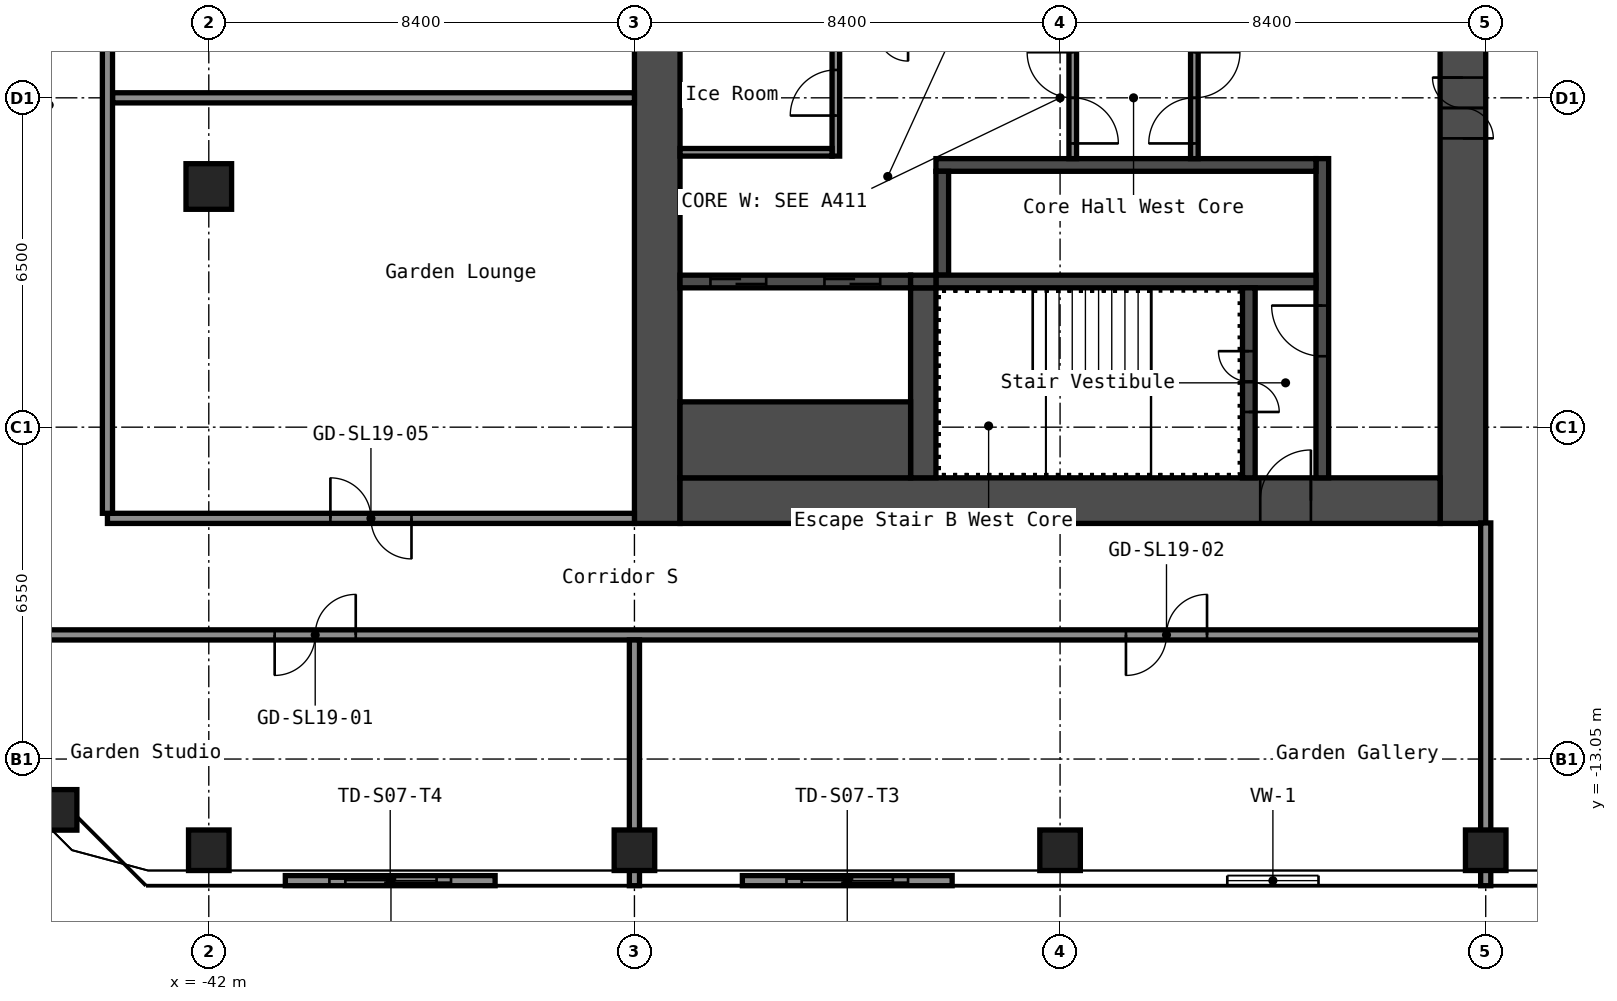
"""IFC4 building model, lengths in metres.
Left out: names, types, materials, properties, quantities, classifications, styles, units other than length and angle.
Written with IfcOpenShell. Run it as: python <this file> out.ifc"""

import sys

from ifc_helpers import new_model, si_unit, direction, frame, frame_2d, origin, origin_2d, place, context, subcontext, project, spatial, rectangle, hollow_rectangle, extrude, element, fill, save


model = new_model("IFC4")
c1 = context("Model", 3, precision=1e-05, world=origin(), true_north=direction((0.0, 1.0)))
c2 = subcontext(c1, "Body", "Model", "MODEL_VIEW")
j1 = project(units=[si_unit("LENGTHUNIT", "METRE"), si_unit("PLANEANGLEUNIT", "RADIAN")], contexts=[c1])
p1 = place(None, origin())
s1 = spatial("IfcSite", under=j1, at=p1, CompositionType="ELEMENT")
p2 = place(p1, origin())
s2 = spatial("IfcBuilding", under=s1, at=p2, CompositionType="ELEMENT")
p3 = place(p2, frame((0.0, 0.0, 69.0)))
s3 = spatial("IfcBuildingStorey", under=s2, at=p3, CompositionType="ELEMENT", Elevation=69.0)
for number, where, z_axis, x_axis in (
    (1, (-45.003, -14.053, 0.0), (0.0, 0.0, 1.0), (1.0, 0.0, 0.0)),
    (2, (-42.0, -14.85, 0.0), (0.0, 0.0, 1.0), (1.0, 0.0, 0.0)),
):
    element("IfcColumn", number, at=place(p3, frame(where, z_axis=z_axis, x_axis=x_axis)), inside=s3, PredefinedType="COLUMN", context=c2, shape_type="SweptSolid", body=[
        extrude(hollow_rectangle(XDim=0.8, YDim=0.8, WallThickness=0.032, at=origin_2d()), origin(), (0.0, 0.0, 1.0), 6.0),
    ])
p4 = place(p3, frame((-42.0, -1.75, 0.0), z_axis=(0.0, 0.0, 1.0), x_axis=(1.0, 0.0, 0.0)))
e3 = element("IfcColumn", 3, at=p4, inside=s3, PredefinedType="COLUMN", context=c2, shape_type="SweptSolid", body=[
    extrude(hollow_rectangle(XDim=0.9, YDim=0.9, WallThickness=0.036, at=origin_2d()), origin(), (0.0, 0.0, 1.0), 6.0),
])
for number, where, z_axis, x_axis in (
    (4, (-33.6, -14.85, 0.0), (0.0, 0.0, 1.0), (1.0, 0.0, 0.0)),
    (5, (-25.2, -14.85, 0.0), (0.0, 0.0, 1.0), (1.0, 0.0, 0.0)),
    (6, (-16.8, -14.85, 0.0), (0.0, 0.0, 1.0), (1.0, 0.0, 0.0)),
):
    element("IfcColumn", number, at=place(p3, frame(where, z_axis=z_axis, x_axis=x_axis)), inside=s3, PredefinedType="COLUMN", context=c2, shape_type="SweptSolid", body=[
        extrude(hollow_rectangle(XDim=0.8, YDim=0.8, WallThickness=0.032, at=origin_2d()), origin(), (0.0, 0.0, 1.0), 6.0),
    ])
p5 = place(p3, frame((-17.25, -8.4, 0.0), z_axis=(0.0, 0.0, 1.0), x_axis=(0.0, 1.0, 0.0)))
e7 = element("IfcWall", 7, at=p5, inside=s3, PredefinedType="SHEAR", context=c2, shape_type="SweptSolid", body=[
    extrude(rectangle(XDim=16.8, YDim=0.9, at=frame_2d((8.4, 0.0))), origin(), (0.0, 0.0, 1.0), 6.0),
])
p6 = place(p5, frame((7.6, 0.0, 0.0)))
e8 = element("IfcOpeningElement", 8, at=p6, cuts=e7, PredefinedType="OPENING", context=c2, shape_type="SweptSolid", body=[
    extrude(rectangle(XDim=1.2, YDim=2.1, at=frame_2d((0.6, 1.05))), frame((0.0, 0.46, 0.0), z_axis=(0.0, -1.0, 0.0), x_axis=(1.0, 0.0, 0.0)), (0.0, 0.0, 1.0), 0.92),
])
p7 = place(p3, frame((-33.15, -8.4, 0.0), z_axis=(0.0, 0.0, 1.0), x_axis=(0.0, 1.0, 0.0)))
e9 = element("IfcWall", 9, at=p7, inside=s3, PredefinedType="SHEAR", context=c2, shape_type="SweptSolid", body=[
    extrude(rectangle(XDim=16.8, YDim=0.9, at=frame_2d((8.4, 0.0))), origin(), (0.0, 0.0, 1.0), 6.0),
])
p8 = place(p3, frame((-32.7, -7.95, 0.0), z_axis=(0.0, 0.0, 1.0), x_axis=(1.0, 0.0, 0.0)))
e10 = element("IfcWall", 10, at=p8, inside=s3, PredefinedType="SHEAR", context=c2, shape_type="SweptSolid", body=[
    extrude(rectangle(XDim=15.0, YDim=0.9, at=frame_2d((7.5, 0.0))), origin(), (0.0, 0.0, 1.0), 6.0),
])
p9 = place(p8, frame((11.45, 0.0, 0.0)))
e11 = element("IfcOpeningElement", 11, at=p9, cuts=e10, PredefinedType="OPENING", context=c2, shape_type="SweptSolid", body=[
    extrude(rectangle(XDim=1.0, YDim=2.1, at=frame_2d((0.5, 1.05))), frame((0.0, 0.46, 0.0), z_axis=(0.0, -1.0, 0.0), x_axis=(1.0, 0.0, 0.0)), (0.0, 0.0, 1.0), 0.92),
])
p10 = place(p3, frame((-20.025, -7.5, 0.0), z_axis=(0.0, 0.0, 1.0), x_axis=(0.0, 1.0, 0.0)))
e12 = element("IfcWall", 12, at=p10, inside=s3, PredefinedType="SHEAR", context=c2, shape_type="SweptSolid", body=[
    extrude(rectangle(XDim=6.3, YDim=0.25, at=frame_2d((3.15, 0.0))), origin(), (0.0, 0.0, 1.0), 6.0),
])
p11 = place(p10, frame((2.4, 0.0, 0.0)))
e13 = element("IfcOpeningElement", 13, at=p11, cuts=e12, PredefinedType="OPENING", context=c2, shape_type="SweptSolid", body=[
    extrude(rectangle(XDim=1.0, YDim=2.1, at=frame_2d((0.5, 1.05))), frame((0.0, 0.135, 0.0), z_axis=(0.0, -1.0, 0.0), x_axis=(1.0, 0.0, 0.0)), (0.0, 0.0, 1.0), 0.27),
])
p12 = place(p3, frame((-27.65, -1.325, 0.0), z_axis=(0.0, 0.0, 1.0), x_axis=(1.0, 0.0, 0.0)))
e14 = element("IfcWall", 14, at=p12, inside=s3, PredefinedType="SHEAR", context=c2, shape_type="SweptSolid", body=[
    extrude(rectangle(XDim=7.5, YDim=0.25, at=frame_2d((3.75, 0.0))), origin(), (0.0, 0.0, 1.0), 6.0),
])
p13 = place(p3, frame((-27.525, -3.5, 0.0), z_axis=(0.0, 0.0, 1.0), x_axis=(0.0, 1.0, 0.0)))
e15 = element("IfcWall", 15, at=p13, inside=s3, PredefinedType="SHEAR", context=c2, shape_type="SweptSolid", body=[
    extrude(rectangle(XDim=2.05, YDim=0.25, at=frame_2d((1.025, 0.0))), origin(), (0.0, 0.0, 1.0), 6.0),
])
p14 = place(p3, frame((-27.65, -3.625, 0.0), z_axis=(0.0, 0.0, 1.0), x_axis=(1.0, 0.0, 0.0)))
e16 = element("IfcWall", 16, at=p14, inside=s3, PredefinedType="SHEAR", context=c2, shape_type="SweptSolid", body=[
    extrude(rectangle(XDim=7.5, YDim=0.25, at=frame_2d((3.75, 0.0))), origin(), (0.0, 0.0, 1.0), 6.0),
])
p15 = place(p3, frame((-21.475, -7.5, 0.0), z_axis=(0.0, 0.0, 1.0), x_axis=(0.0, 1.0, 0.0)))
e17 = element("IfcWall", 17, at=p15, inside=s3, PredefinedType="SHEAR", context=c2, shape_type="SweptSolid", body=[
    extrude(rectangle(XDim=3.75, YDim=0.25, at=frame_2d((1.875, 0.0))), origin(), (0.0, 0.0, 1.0), 6.0),
])
p16 = place(p15, frame((1.3, 0.0, 0.0)))
e18 = element("IfcOpeningElement", 18, at=p16, cuts=e17, PredefinedType="OPENING", context=c2, shape_type="SweptSolid", body=[
    extrude(rectangle(XDim=1.2, YDim=2.1, at=frame_2d((0.6, 1.05))), frame((0.0, 0.135, 0.0), z_axis=(0.0, -1.0, 0.0), x_axis=(1.0, 0.0, 0.0)), (0.0, 0.0, 1.0), 0.27),
])
p17 = place(p3, frame((-27.9, -7.5, 0.0), z_axis=(0.0, 0.0, 1.0), x_axis=(0.0, 1.0, 0.0)))
e19 = element("IfcWall", 19, at=p17, inside=s3, PredefinedType="SHEAR", context=c2, shape_type="SweptSolid", body=[
    extrude(rectangle(XDim=3.75, YDim=0.5, at=frame_2d((1.875, 0.0))), origin(), (0.0, 0.0, 1.0), 6.0),
])
p18 = place(p3, frame((-32.7, -3.625, 0.0), z_axis=(0.0, 0.0, 1.0), x_axis=(1.0, 0.0, 0.0)))
e20 = element("IfcWall", 20, at=p18, inside=s3, PredefinedType="SHEAR", context=c2, shape_type="SweptSolid", body=[
    extrude(rectangle(XDim=4.55, YDim=0.25, at=frame_2d((2.275, 0.0))), origin(), (0.0, 0.0, 1.0), 6.0),
])
p19 = place(p18, frame((2.85, 0.0, 0.0)))
e21 = element("IfcOpeningElement", 21, at=p19, cuts=e20, PredefinedType="OPENING", context=c2, shape_type="SweptSolid", body=[
    extrude(rectangle(XDim=1.1, YDim=2.1, at=frame_2d((0.55, 1.05))), frame((0.0, 0.135, 0.0), z_axis=(0.0, -1.0, 0.0), x_axis=(1.0, 0.0, 0.0)), (0.0, 0.0, 1.0), 0.27),
])
p20 = place(p18, frame((0.6, 0.0, 0.0)))
e22 = element("IfcOpeningElement", 22, at=p20, cuts=e20, PredefinedType="OPENING", context=c2, shape_type="SweptSolid", body=[
    extrude(rectangle(XDim=1.1, YDim=2.1, at=frame_2d((0.55, 1.05))), frame((0.0, 0.135, 0.0), z_axis=(0.0, -1.0, 0.0), x_axis=(1.0, 0.0, 0.0)), (0.0, 0.0, 1.0), 0.27),
])
p21 = place(p3, frame((-32.7, -6.75, 0.0), z_axis=(0.0, 0.0, 1.0), x_axis=(1.0, 0.0, 0.0)))
e23 = element("IfcWall", 23, at=p21, inside=s3, PredefinedType="SHEAR", context=c2, shape_type="SweptSolid", body=[
    extrude(rectangle(XDim=4.55, YDim=1.5, at=frame_2d((2.275, 0.0))), origin(), (0.0, 0.0, 1.0), 6.0),
])
p22 = place(p3, frame((-28.15, -3.625, 0.0), z_axis=(0.0, 0.0, 1.0), x_axis=(1.0, 0.0, 0.0)))
e24 = element("IfcWall", 24, at=p22, inside=s3, PredefinedType="SHEAR", context=c2, shape_type="SweptSolid", body=[
    extrude(rectangle(XDim=0.5, YDim=0.25, at=frame_2d((0.25, 0.0))), origin(), (0.0, 0.0, 1.0), 6.0),
])
p23 = place(p3, frame((-22.55, -1.2, 0.0), z_axis=(0.0, 0.0, 1.0), x_axis=(0.0, 1.0, 0.0)))
e25 = element("IfcWall", 25, at=p23, inside=s3, PredefinedType="PARTITIONING", context=c2, shape_type="SweptSolid", body=[
    extrude(rectangle(XDim=2.4, YDim=0.15, at=frame_2d((1.2, 0.0))), origin(), (0.0, 0.0, 1.0), 6.0),
])
p24 = place(p23, frame((0.3, 0.0, 0.0)))
e26 = element("IfcOpeningElement", 26, at=p24, cuts=e25, PredefinedType="OPENING", context=c2, shape_type="SweptSolid", body=[
    extrude(rectangle(XDim=1.8, YDim=2.1, at=frame_2d((0.9, 1.05))), frame((0.0, 0.085, 0.0), z_axis=(0.0, -1.0, 0.0), x_axis=(1.0, 0.0, 0.0)), (0.0, 0.0, 1.0), 0.17),
])
p25 = place(p3, frame((-24.95, -1.2, 0.0), z_axis=(0.0, 0.0, 1.0), x_axis=(0.0, 1.0, 0.0)))
e27 = element("IfcWall", 27, at=p25, inside=s3, PredefinedType="PARTITIONING", context=c2, shape_type="SweptSolid", body=[
    extrude(rectangle(XDim=2.4, YDim=0.15, at=frame_2d((1.2, 0.0))), origin(), (0.0, 0.0, 1.0), 6.0),
])
p26 = place(p25, frame((0.3, 0.0, 0.0)))
e28 = element("IfcOpeningElement", 28, at=p26, cuts=e27, PredefinedType="OPENING", context=c2, shape_type="SweptSolid", body=[
    extrude(rectangle(XDim=1.8, YDim=2.1, at=frame_2d((0.9, 1.05))), frame((0.0, 0.085, 0.0), z_axis=(0.0, -1.0, 0.0), x_axis=(1.0, 0.0, 0.0)), (0.0, 0.0, 1.0), 0.17),
])
p27 = place(p3, frame((-29.625, -1.15, 0.0), z_axis=(0.0, 0.0, 1.0), x_axis=(0.0, 1.0, 0.0)))
e29 = element("IfcWall", 29, at=p27, inside=s3, PredefinedType="PARTITIONING", context=c2, shape_type="SweptSolid", body=[
    extrude(rectangle(XDim=2.35, YDim=0.15, at=frame_2d((1.175, 0.0))), origin(), (0.0, 0.0, 1.0), 6.0),
])
p28 = place(p27, frame((0.8, 0.0, 0.0)))
e30 = element("IfcOpeningElement", 30, at=p28, cuts=e29, PredefinedType="OPENING", context=c2, shape_type="SweptSolid", body=[
    extrude(rectangle(XDim=0.9, YDim=2.1, at=frame_2d((0.45, 1.05))), frame((0.0, 0.085, 0.0), z_axis=(0.0, -1.0, 0.0), x_axis=(1.0, 0.0, 0.0)), (0.0, 0.0, 1.0), 0.17),
])
p29 = place(p3, frame((-32.7, -1.075, 0.0), z_axis=(0.0, 0.0, 1.0), x_axis=(1.0, 0.0, 0.0)))
e31 = element("IfcWall", 31, at=p29, inside=s3, PredefinedType="PARTITIONING", context=c2, shape_type="SweptSolid", body=[
    extrude(rectangle(XDim=3.0, YDim=0.15, at=frame_2d((1.5, 0.0))), origin(), (0.0, 0.0, 1.0), 6.0),
])
p30 = place(p3, frame((-46.5, -10.6, 0.0), z_axis=(0.0, 0.0, 1.0), x_axis=(1.0, 0.0, 0.0)))
e32 = element("IfcWall", 32, at=p30, inside=s3, PredefinedType="PARTITIONING", context=c2, shape_type="SweptSolid", body=[
    extrude(rectangle(XDim=29.7, YDim=0.2, at=frame_2d((14.85, 0.0))), origin(), (0.0, 0.0, 1.0), 6.0),
])
p31 = place(p30, frame((5.8, 0.0, 0.0)))
e33 = element("IfcOpeningElement", 33, at=p31, cuts=e32, PredefinedType="OPENING", context=c2, shape_type="SweptSolid", body=[
    extrude(rectangle(XDim=1.6, YDim=2.1, at=frame_2d((0.8, 1.05))), frame((0.0, 0.11, 0.0), z_axis=(0.0, -1.0, 0.0), x_axis=(1.0, 0.0, 0.0)), (0.0, 0.0, 1.0), 0.22),
])
p32 = place(p30, frame((22.6, 0.0, 0.0)))
e34 = element("IfcOpeningElement", 34, at=p32, cuts=e32, PredefinedType="OPENING", context=c2, shape_type="SweptSolid", body=[
    extrude(rectangle(XDim=1.6, YDim=2.1, at=frame_2d((0.8, 1.05))), frame((0.0, 0.11, 0.0), z_axis=(0.0, -1.0, 0.0), x_axis=(1.0, 0.0, 0.0)), (0.0, 0.0, 1.0), 0.22),
])
p33 = place(p3, frame((-44.0, -8.3, 0.0), z_axis=(0.0, 0.0, 1.0), x_axis=(1.0, 0.0, 0.0)))
e35 = element("IfcWall", 35, at=p33, inside=s3, PredefinedType="PARTITIONING", context=c2, shape_type="SweptSolid", body=[
    extrude(rectangle(XDim=10.4, YDim=0.2, at=frame_2d((5.2, 0.0))), origin(), (0.0, 0.0, 1.0), 6.0),
])
p34 = place(p33, frame((4.4, 0.0, 0.0)))
e36 = element("IfcOpeningElement", 36, at=p34, cuts=e35, PredefinedType="OPENING", context=c2, shape_type="SweptSolid", body=[
    extrude(rectangle(XDim=1.6, YDim=2.1, at=frame_2d((0.8, 1.05))), frame((0.0, 0.11, 0.0), z_axis=(0.0, -1.0, 0.0), x_axis=(1.0, 0.0, 0.0)), (0.0, 0.0, 1.0), 0.22),
])
p35 = place(p3, frame((-43.9, 0.0, 0.0), z_axis=(0.0, 0.0, 1.0), x_axis=(1.0, 0.0, 0.0)))
e37 = element("IfcWall", 37, at=p35, inside=s3, PredefinedType="PARTITIONING", context=c2, shape_type="SweptSolid", body=[
    extrude(rectangle(XDim=10.3, YDim=0.2, at=frame_2d((5.15, 0.0))), origin(), (0.0, 0.0, 1.0), 6.0),
])
p36 = place(p3, frame((-44.0, -8.2, 0.0), z_axis=(0.0, 0.0, 1.0), x_axis=(0.0, 1.0, 0.0)))
e38 = element("IfcWall", 38, at=p36, inside=s3, PredefinedType="PARTITIONING", context=c2, shape_type="SweptSolid", body=[
    extrude(rectangle(XDim=16.4, YDim=0.2, at=frame_2d((8.2, 0.0))), origin(), (0.0, 0.0, 1.0), 6.0),
])
p37 = place(p3, frame((-33.6, -15.55, 0.0), z_axis=(0.0, 0.0, 1.0), x_axis=(0.0, 1.0, 0.0)))
e39 = element("IfcWall", 39, at=p37, inside=s3, PredefinedType="PARTITIONING", context=c2, shape_type="SweptSolid", body=[
    extrude(rectangle(XDim=4.85, YDim=0.2, at=frame_2d((2.425, 0.0))), origin(), (0.0, 0.0, 1.0), 6.0),
])
p38 = place(p3, frame((-16.8, -15.55, 0.0), z_axis=(0.0, 0.0, 1.0), x_axis=(0.0, 1.0, 0.0)))
e40 = element("IfcWall", 40, at=p38, inside=s3, PredefinedType="PARTITIONING", context=c2, shape_type="SweptSolid", body=[
    extrude(rectangle(XDim=7.16, YDim=0.2, at=frame_2d((3.58, 0.0))), origin(), (0.0, 0.0, 1.0), 6.0),
])
p39 = place(p3, frame((-43.209, -15.45, 4.45), z_axis=(0.0, 0.0, 1.0), x_axis=(1.0, 0.0, 0.0)))
p40 = place(p39, frame((3.905, 0.0, 0.25)))
p41 = place(p40, origin())
e41 = element("IfcWindow", 41, at=p41, inside=s3, PartitioningType="SINGLE_PANEL", PredefinedType="WINDOW", context=c2, shape_type="SweptSolid", body=[
    extrude(rectangle(XDim=1.8, YDim=0.9, at=frame_2d((0.9, 0.45))), frame((0.0, 0.03, 0.0), z_axis=(0.0, -1.0, 0.0), x_axis=(1.0, 0.0, 0.0)), (0.0, 0.0, 1.0), 0.06),
])
p42 = place(p3, frame((-33.6, -15.45, 4.45), z_axis=(0.0, 0.0, 1.0), x_axis=(1.0, 0.0, 0.0)))
p43 = place(p42, frame((3.3, 0.0, 0.25)))
p44 = place(p43, origin())
e42 = element("IfcWindow", 42, at=p44, inside=s3, PartitioningType="SINGLE_PANEL", PredefinedType="WINDOW", context=c2, shape_type="SweptSolid", body=[
    extrude(rectangle(XDim=1.8, YDim=0.9, at=frame_2d((0.9, 0.45))), frame((0.0, 0.03, 0.0), z_axis=(0.0, -1.0, 0.0), x_axis=(1.0, 0.0, 0.0)), (0.0, 0.0, 1.0), 0.06),
])
p45 = place(p3, frame((-25.2, -15.45, 4.45), z_axis=(0.0, 0.0, 1.0), x_axis=(1.0, 0.0, 0.0)))
p46 = place(p45, frame((3.3, 0.0, 0.25)))
p47 = place(p46, origin())
e43 = element("IfcWindow", 43, at=p47, inside=s3, PartitioningType="SINGLE_PANEL", PredefinedType="WINDOW", context=c2, shape_type="SweptSolid", body=[
    extrude(rectangle(XDim=1.8, YDim=0.9, at=frame_2d((0.9, 0.45))), frame((0.0, 0.03, 0.0), z_axis=(0.0, -1.0, 0.0), x_axis=(1.0, 0.0, 0.0)), (0.0, 0.0, 1.0), 0.06),
])
p48 = place(p3, frame((-40.49, -15.45, 0.0), z_axis=(0.0, 0.0, 1.0), x_axis=(1.0, 0.0, 0.0)))
p49 = place(p48, frame((0.87, 0.0, 0.0)))
p50 = place(p49, frame((2.4, 0.0, 0.0), z_axis=(0.0, 0.0, 1.0), x_axis=(-1.0, 0.0, 0.0)))
e44 = element("IfcDoor", 44, at=p50, inside=s3, OperationType="SLIDING_TO_LEFT", PredefinedType="DOOR", context=c2, shape_type="SweptSolid", body=[
    extrude(rectangle(XDim=2.4, YDim=2.2, at=frame_2d((1.2, 1.1))), frame((0.0, 0.025, 0.0), z_axis=(0.0, -1.0, 0.0), x_axis=(1.0, 0.0, 0.0)), (0.0, 0.0, 1.0), 0.05),
])
p51 = place(p3, frame((-31.47, -15.45, 0.0), z_axis=(0.0, 0.0, 1.0), x_axis=(1.0, 0.0, 0.0)))
p52 = place(p51, frame((0.87, 0.0, 0.0)))
p53 = place(p52, frame((2.4, 0.0, 0.0), z_axis=(0.0, 0.0, 1.0), x_axis=(-1.0, 0.0, 0.0)))
e45 = element("IfcDoor", 45, at=p53, inside=s3, OperationType="SLIDING_TO_LEFT", PredefinedType="DOOR", context=c2, shape_type="SweptSolid", body=[
    extrude(rectangle(XDim=2.4, YDim=2.2, at=frame_2d((1.2, 1.1))), frame((0.0, 0.025, 0.0), z_axis=(0.0, -1.0, 0.0), x_axis=(1.0, 0.0, 0.0)), (0.0, 0.0, 1.0), 0.05),
])
p54 = place(p6, origin())
e46 = element("IfcDoor", 46, at=p54, inside=s3, OperationType="DOUBLE_DOOR_SINGLE_SWING", PredefinedType="DOOR", context=c2, shape_type="SweptSolid", body=[
    extrude(rectangle(XDim=1.2, YDim=2.1, at=frame_2d((0.6, 1.05))), frame((0.0, 0.025, 0.0), z_axis=(0.0, -1.0, 0.0), x_axis=(1.0, 0.0, 0.0)), (0.0, 0.0, 1.0), 0.05),
])
fill(e8, e46)
p55 = place(p9, origin())
e47 = element("IfcDoor", 47, at=p55, inside=s3, OperationType="SINGLE_SWING_LEFT", PredefinedType="DOOR", context=c2, shape_type="SweptSolid", body=[
    extrude(rectangle(XDim=1.0, YDim=2.1, at=frame_2d((0.5, 1.05))), frame((0.0, 0.025, 0.0), z_axis=(0.0, -1.0, 0.0), x_axis=(1.0, 0.0, 0.0)), (0.0, 0.0, 1.0), 0.05),
])
fill(e11, e47)
p56 = place(p16, origin())
e48 = element("IfcDoor", 48, at=p56, inside=s3, OperationType="DOUBLE_DOOR_SINGLE_SWING", PredefinedType="DOOR", context=c2, shape_type="SweptSolid", body=[
    extrude(rectangle(XDim=1.2, YDim=2.1, at=frame_2d((0.6, 1.05))), frame((0.0, 0.025, 0.0), z_axis=(0.0, -1.0, 0.0), x_axis=(1.0, 0.0, 0.0)), (0.0, 0.0, 1.0), 0.05),
])
fill(e18, e48)
p57 = place(p11, origin())
e49 = element("IfcDoor", 49, at=p57, inside=s3, OperationType="SINGLE_SWING_LEFT", PredefinedType="DOOR", context=c2, shape_type="SweptSolid", body=[
    extrude(rectangle(XDim=1.0, YDim=2.1, at=frame_2d((0.5, 1.05))), frame((0.0, 0.025, 0.0), z_axis=(0.0, -1.0, 0.0), x_axis=(1.0, 0.0, 0.0)), (0.0, 0.0, 1.0), 0.05),
])
fill(e13, e49)
p58 = place(p24, origin())
e50 = element("IfcDoor", 50, at=p58, inside=s3, OperationType="DOUBLE_DOOR_SINGLE_SWING", PredefinedType="DOOR", context=c2, shape_type="SweptSolid", body=[
    extrude(rectangle(XDim=1.8, YDim=2.1, at=frame_2d((0.9, 1.05))), frame((0.0, 0.025, 0.0), z_axis=(0.0, -1.0, 0.0), x_axis=(1.0, 0.0, 0.0)), (0.0, 0.0, 1.0), 0.05),
])
fill(e26, e50)
p59 = place(p26, origin())
e51 = element("IfcDoor", 51, at=p59, inside=s3, OperationType="DOUBLE_DOOR_SINGLE_SWING", PredefinedType="DOOR", context=c2, shape_type="SweptSolid", body=[
    extrude(rectangle(XDim=1.8, YDim=2.1, at=frame_2d((0.9, 1.05))), frame((0.0, 0.025, 0.0), z_axis=(0.0, -1.0, 0.0), x_axis=(1.0, 0.0, 0.0)), (0.0, 0.0, 1.0), 0.05),
])
fill(e28, e51)
p60 = place(p28, origin())
e52 = element("IfcDoor", 52, at=p60, inside=s3, OperationType="SINGLE_SWING_RIGHT", PredefinedType="DOOR", context=c2, shape_type="SweptSolid", body=[
    extrude(rectangle(XDim=0.9, YDim=2.1, at=frame_2d((0.45, 1.05))), frame((0.0, 0.025, 0.0), z_axis=(0.0, -1.0, 0.0), x_axis=(1.0, 0.0, 0.0)), (0.0, 0.0, 1.0), 0.05),
])
fill(e30, e52)
p61 = place(p19, origin())
e53 = element("IfcDoor", 53, at=p61, inside=s3, OperationType="DOUBLE_DOOR_SLIDING", PredefinedType="DOOR", context=c2, shape_type="SweptSolid", body=[
    extrude(rectangle(XDim=1.1, YDim=2.1, at=frame_2d((0.55, 1.05))), frame((0.0, 0.025, 0.0), z_axis=(0.0, -1.0, 0.0), x_axis=(1.0, 0.0, 0.0)), (0.0, 0.0, 1.0), 0.05),
])
fill(e21, e53)
p62 = place(p20, origin())
e54 = element("IfcDoor", 54, at=p62, inside=s3, OperationType="DOUBLE_DOOR_SLIDING", PredefinedType="DOOR", context=c2, shape_type="SweptSolid", body=[
    extrude(rectangle(XDim=1.1, YDim=2.1, at=frame_2d((0.55, 1.05))), frame((0.0, 0.025, 0.0), z_axis=(0.0, -1.0, 0.0), x_axis=(1.0, 0.0, 0.0)), (0.0, 0.0, 1.0), 0.05),
])
fill(e22, e54)
p63 = place(p31, origin())
e55 = element("IfcDoor", 55, at=p63, inside=s3, OperationType="DOUBLE_DOOR_SINGLE_SWING", PredefinedType="DOOR", context=c2, shape_type="SweptSolid", body=[
    extrude(rectangle(XDim=1.6, YDim=2.1, at=frame_2d((0.8, 1.05))), frame((0.0, 0.025, 0.0), z_axis=(0.0, -1.0, 0.0), x_axis=(1.0, 0.0, 0.0)), (0.0, 0.0, 1.0), 0.05),
])
fill(e33, e55)
p64 = place(p32, origin())
e56 = element("IfcDoor", 56, at=p64, inside=s3, OperationType="DOUBLE_DOOR_SINGLE_SWING", PredefinedType="DOOR", context=c2, shape_type="SweptSolid", body=[
    extrude(rectangle(XDim=1.6, YDim=2.1, at=frame_2d((0.8, 1.05))), frame((0.0, 0.025, 0.0), z_axis=(0.0, -1.0, 0.0), x_axis=(1.0, 0.0, 0.0)), (0.0, 0.0, 1.0), 0.05),
])
fill(e34, e56)
p65 = place(p34, origin())
e57 = element("IfcDoor", 57, at=p65, inside=s3, OperationType="DOUBLE_DOOR_SINGLE_SWING", PredefinedType="DOOR", context=c2, shape_type="SweptSolid", body=[
    extrude(rectangle(XDim=1.6, YDim=2.1, at=frame_2d((0.8, 1.05))), frame((0.0, 0.025, 0.0), z_axis=(0.0, -1.0, 0.0), x_axis=(1.0, 0.0, 0.0)), (0.0, 0.0, 1.0), 0.05),
])
fill(e36, e57)
save(model, sys.argv[1])
